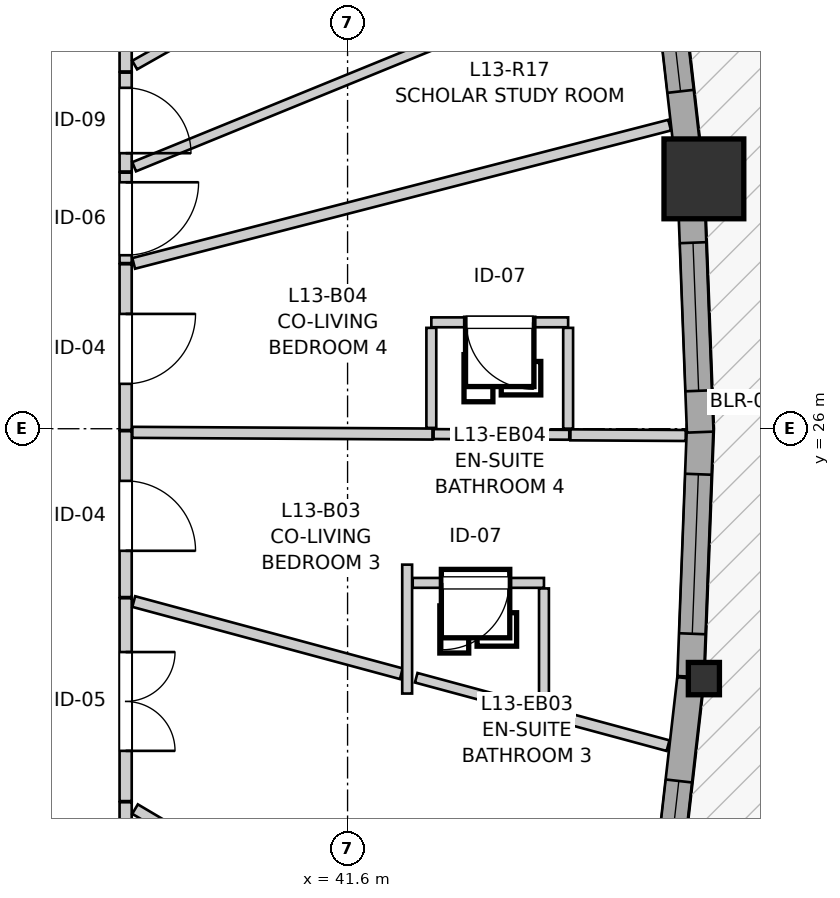
"""IFC4 building model, lengths in metres.
Left out: names, types, materials, properties, quantities, classifications, styles, units other than length and angle.
Written with IfcOpenShell. Run it as: python <this file> out.ifc"""

import sys

from ifc_helpers import new_model, si_unit, direction, frame, frame_2d, origin, origin_2d, place, context, subcontext, project, spatial, rectangle, i_section, extrude, source, transform, mapped, element, fill, save


model = new_model("IFC4")
c1 = context("Model", 3, precision=1e-05, world=origin(), true_north=direction((0.0, 1.0)))
c2 = subcontext(c1, "Body", "Model", "MODEL_VIEW")
j1 = project(units=[si_unit("LENGTHUNIT", "METRE"), si_unit("PLANEANGLEUNIT", "RADIAN")], contexts=[c1])
p1 = place(None, origin())
s1 = spatial("IfcSite", under=j1, at=p1, CompositionType="ELEMENT")
p2 = place(p1, origin())
s2 = spatial("IfcBuilding", under=s1, at=p2, CompositionType="ELEMENT")
p3 = place(p2, frame((0.0, 0.0, 46.2)))
s3 = spatial("IfcBuildingStorey", under=s2, at=p3, CompositionType="ELEMENT", Elevation=46.2)
m1 = source(origin(), c2, "Body", "SweptSolid", [
    extrude(i_section(OverallWidth=0.409, OverallDepth=0.425, WebThickness=0.03, FlangeThickness=0.048, FilletRadius=0.015, at=origin_2d()), origin(), (0.0, 0.0, 1.0), 2.94),
])
p4 = place(p3, frame((46.288, 22.713, 0.0), z_axis=(0.0, 0.0, 1.0), x_axis=(1.0, 0.0, 0.0)))
e1 = element("IfcColumn", 1, at=p4, inside=s3, PredefinedType="PILASTER", context=c2, shape_type="MappedRepresentation", body=[
    mapped(m1, transform((0.0, 0.0, 0.0), x_axis=(1.0, 0.0, 0.0), y_axis=(0.0, 1.0, 0.0), z_axis=(0.0, 0.0, 1.0), scale=1.0)),
])
m2 = source(origin(), c2, "Body", "SweptSolid", [
    extrude(rectangle(XDim=1.05, YDim=1.05, at=origin_2d()), origin(), (0.0, 0.0, 1.0), 2.94),
])
p5 = place(p3, frame((46.288, 29.287, 0.0), z_axis=(0.0, 0.0, 1.0), x_axis=(1.0, 0.0, 0.0)))
e2 = element("IfcColumn", 2, at=p5, inside=s3, PredefinedType="COLUMN", context=c2, shape_type="MappedRepresentation", body=[
    mapped(m2, transform((0.0, 0.0, 0.0), x_axis=(1.0, 0.0, 0.0), y_axis=(0.0, 1.0, 0.0), z_axis=(0.0, 0.0, 1.0), scale=1.0)),
])
p6 = place(p3, frame((45.735, 19.407, 0.0), z_axis=(0.0, 0.0, 1.0), x_axis=(0.113314766684, 0.993559139484, 0.0)))
e3 = element("IfcWall", 3, at=p6, inside=s3, PredefinedType="SOLIDWALL", context=c2, shape_type="SweptSolid", body=[
    extrude(rectangle(XDim=3.327, YDim=0.35, at=frame_2d((1.663, 0.0))), origin(), (0.0, 0.0, 1.0), 2.42),
])
p7 = place(p6, frame((0.521, 0.0, 0.82)))
e4 = element("IfcOpeningElement", 4, at=p7, cuts=e3, PredefinedType="OPENING", context=c2, shape_type="SweptSolid", body=[
    extrude(rectangle(XDim=1.45, YDim=1.25, at=frame_2d((0.725, 0.625))), frame((0.0, 0.185, 0.0), z_axis=(0.0, -1.0, 0.0), x_axis=(1.0, 0.0, 0.0)), (0.0, 0.0, 1.0), 0.37),
])
p8 = place(p3, frame((46.114, 22.739, 0.0), z_axis=(0.0, 0.0, 1.0), x_axis=(0.038010770715, 0.999277329529, 0.0)))
e5 = element("IfcWall", 5, at=p8, inside=s3, PredefinedType="SOLIDWALL", context=c2, shape_type="SweptSolid", body=[
    extrude(rectangle(XDim=3.308, YDim=0.35, at=frame_2d((1.654, 0.0))), origin(), (0.0, 0.0, 1.0), 2.42),
])
p9 = place(p8, frame((0.564, 0.0, 0.82)))
e6 = element("IfcOpeningElement", 6, at=p9, cuts=e5, PredefinedType="OPENING", context=c2, shape_type="SweptSolid", body=[
    extrude(rectangle(XDim=2.1, YDim=1.4, at=frame_2d((1.05, 0.7))), frame((0.0, 0.185, 0.0), z_axis=(0.0, -1.0, 0.0), x_axis=(1.0, 0.0, 0.0)), (0.0, 0.0, 1.0), 0.37),
])
p10 = place(p3, frame((46.24, 25.955, 0.0), z_axis=(0.0, 0.0, 1.0), x_axis=(-0.038058423581, 0.999275515759, 0.0)))
e7 = element("IfcWall", 7, at=p10, inside=s3, PredefinedType="SOLIDWALL", context=c2, shape_type="SweptSolid", body=[
    extrude(rectangle(XDim=3.028, YDim=0.35, at=frame_2d((1.514, 0.0))), origin(), (0.0, 0.0, 1.0), 2.42),
])
p11 = place(p10, frame((0.544, 0.0, 0.82)))
e8 = element("IfcOpeningElement", 8, at=p11, cuts=e7, PredefinedType="OPENING", context=c2, shape_type="SweptSolid", body=[
    extrude(rectangle(XDim=1.95, YDim=1.4, at=frame_2d((0.975, 0.7))), frame((0.0, 0.185, 0.0), z_axis=(0.0, -1.0, 0.0), x_axis=(1.0, 0.0, 0.0)), (0.0, 0.0, 1.0), 0.37),
])
p12 = place(p3, frame((46.08, 29.566, 0.0), z_axis=(0.0, 0.0, 1.0), x_axis=(-0.113307030468, 0.993560021763, 0.0)))
e9 = element("IfcWall", 9, at=p12, inside=s3, PredefinedType="SOLIDWALL", context=c2, shape_type="SweptSolid", body=[
    extrude(rectangle(XDim=3.047, YDim=0.35, at=frame_2d((1.523, 0.0))), origin(), (0.0, 0.0, 1.0), 2.42),
])
p13 = place(p12, frame((0.879, 0.0, 0.82)))
e10 = element("IfcOpeningElement", 10, at=p13, cuts=e9, PredefinedType="OPENING", context=c2, shape_type="SweptSolid", body=[
    extrude(rectangle(XDim=1.4, YDim=1.35, at=frame_2d((0.7, 0.675))), frame((0.0, 0.185, 0.0), z_axis=(0.0, -1.0, 0.0), x_axis=(1.0, 0.0, 0.0)), (0.0, 0.0, 1.0), 0.37),
])
p14 = place(p3, frame((38.68, 36.58, 0.0), z_axis=(0.0, 0.0, 1.0), x_axis=(0.0, -1.0, 0.0)))
e11 = element("IfcWall", 11, at=p14, inside=s3, PredefinedType="PARTITIONING", context=c2, shape_type="SweptSolid", body=[
    extrude(rectangle(XDim=5.88, YDim=0.16, at=frame_2d((2.94, 0.0))), origin(), (0.0, 0.0, 1.0), 2.94),
])
p15 = place(p14, frame((2.281, 0.0, 0.0)))
e12 = element("IfcOpeningElement", 12, at=p15, cuts=e11, PredefinedType="OPENING", context=c2, shape_type="SweptSolid", body=[
    extrude(rectangle(XDim=1.3, YDim=2.1, at=frame_2d((0.65, 1.05))), frame((0.0, 0.09, 0.0), z_axis=(0.0, -1.0, 0.0), x_axis=(1.0, 0.0, 0.0)), (0.0, 0.0, 1.0), 0.18),
])
p16 = place(p3, frame((38.68, 21.086, 0.0), z_axis=(0.0, 0.0, 1.0), x_axis=(0.0, -1.0, 0.0)))
e13 = element("IfcWall", 13, at=p16, inside=s3, PredefinedType="PARTITIONING", context=c2, shape_type="SweptSolid", body=[
    extrude(rectangle(XDim=5.666, YDim=0.16, at=frame_2d((2.833, 0.0))), origin(), (0.0, 0.0, 1.0), 2.94),
])
p17 = place(p16, frame((2.362, 0.0, 0.0)))
e14 = element("IfcOpeningElement", 14, at=p17, cuts=e13, PredefinedType="OPENING", context=c2, shape_type="SweptSolid", body=[
    extrude(rectangle(XDim=0.96, YDim=2.1, at=frame_2d((0.48, 1.05))), frame((0.0, 0.09, 0.0), z_axis=(0.0, -1.0, 0.0), x_axis=(1.0, 0.0, 0.0)), (0.0, 0.0, 1.0), 0.18),
])
p18 = place(p3, frame((38.68, 23.77, 0.0), z_axis=(0.0, 0.0, 1.0), x_axis=(0.0, -1.0, 0.0)))
e15 = element("IfcWall", 15, at=p18, inside=s3, PredefinedType="PARTITIONING", context=c2, shape_type="SweptSolid", body=[
    extrude(rectangle(XDim=2.669, YDim=0.16, at=frame_2d((1.334, 0.0))), origin(), (0.0, 0.0, 1.0), 2.94),
])
p19 = place(p18, frame((0.708, 0.0, 0.0)))
e16 = element("IfcOpeningElement", 16, at=p19, cuts=e15, PredefinedType="OPENING", context=c2, shape_type="SweptSolid", body=[
    extrude(rectangle(XDim=1.3, YDim=2.1, at=frame_2d((0.65, 1.05))), frame((0.0, 0.09, 0.0), z_axis=(0.0, -1.0, 0.0), x_axis=(1.0, 0.0, 0.0)), (0.0, 0.0, 1.0), 0.18),
])
p20 = place(p3, frame((38.68, 25.968, 0.0), z_axis=(0.0, 0.0, 1.0), x_axis=(0.0, -1.0, 0.0)))
e17 = element("IfcWall", 17, at=p20, inside=s3, PredefinedType="PARTITIONING", context=c2, shape_type="SweptSolid", body=[
    extrude(rectangle(XDim=2.183, YDim=0.16, at=frame_2d((1.092, 0.0))), origin(), (0.0, 0.0, 1.0), 2.94),
])
p21 = place(p20, frame((0.654, 0.0, 0.0)))
e18 = element("IfcOpeningElement", 18, at=p21, cuts=e17, PredefinedType="OPENING", context=c2, shape_type="SweptSolid", body=[
    extrude(rectangle(XDim=0.92, YDim=2.1, at=frame_2d((0.46, 1.05))), frame((0.0, 0.09, 0.0), z_axis=(0.0, -1.0, 0.0), x_axis=(1.0, 0.0, 0.0)), (0.0, 0.0, 1.0), 0.18),
])
p22 = place(p3, frame((38.68, 28.164, 0.0), z_axis=(0.0, 0.0, 1.0), x_axis=(0.0, -1.0, 0.0)))
e19 = element("IfcWall", 19, at=p22, inside=s3, PredefinedType="PARTITIONING", context=c2, shape_type="SweptSolid", body=[
    extrude(rectangle(XDim=2.181, YDim=0.16, at=frame_2d((1.091, 0.0))), origin(), (0.0, 0.0, 1.0), 2.94),
])
p23 = place(p22, frame((0.654, 0.0, 0.0)))
e20 = element("IfcOpeningElement", 20, at=p23, cuts=e19, PredefinedType="OPENING", context=c2, shape_type="SweptSolid", body=[
    extrude(rectangle(XDim=0.92, YDim=2.1, at=frame_2d((0.46, 1.05))), frame((0.0, 0.09, 0.0), z_axis=(0.0, -1.0, 0.0), x_axis=(1.0, 0.0, 0.0)), (0.0, 0.0, 1.0), 0.18),
])
p24 = place(p3, frame((44.502, 27.4, 0.0), z_axis=(0.0, 0.0, 1.0), x_axis=(-1.0, 0.0, 0.0)))
e21 = element("IfcWall", 21, at=p24, inside=s3, PredefinedType="PARTITIONING", context=c2, shape_type="SweptSolid", body=[
    extrude(rectangle(XDim=1.8, YDim=0.13, at=frame_2d((0.9, 0.0))), origin(), (0.0, 0.0, 1.0), 2.94),
])
p25 = place(p24, frame((0.46, 0.0, 0.0)))
e22 = element("IfcOpeningElement", 22, at=p25, cuts=e21, PredefinedType="OPENING", context=c2, shape_type="SweptSolid", body=[
    extrude(rectangle(XDim=0.88, YDim=2.05, at=frame_2d((0.44, 1.025))), frame((0.0, 0.075, 0.0), z_axis=(0.0, -1.0, 0.0), x_axis=(1.0, 0.0, 0.0)), (0.0, 0.0, 1.0), 0.15),
])
p26 = place(p3, frame((44.184, 23.972, 0.0), z_axis=(0.0, 0.0, 1.0), x_axis=(-1.0, 0.0, 0.0)))
e23 = element("IfcWall", 23, at=p26, inside=s3, PredefinedType="PARTITIONING", context=c2, shape_type="SweptSolid", body=[
    extrude(rectangle(XDim=1.727, YDim=0.13, at=frame_2d((0.864, 0.0))), origin(), (0.0, 0.0, 1.0), 2.94),
])
p27 = place(p26, frame((0.46, 0.0, 0.0)))
e24 = element("IfcOpeningElement", 24, at=p27, cuts=e23, PredefinedType="OPENING", context=c2, shape_type="SweptSolid", body=[
    extrude(rectangle(XDim=0.88, YDim=2.05, at=frame_2d((0.44, 1.025))), frame((0.0, 0.075, 0.0), z_axis=(0.0, -1.0, 0.0), x_axis=(1.0, 0.0, 0.0)), (0.0, 0.0, 1.0), 0.15),
])
p28 = place(p3, frame((38.68, 30.685, 0.0), z_axis=(0.0, 0.0, 1.0), x_axis=(0.0, -1.0, 0.0)))
e25 = element("IfcWall", 25, at=p28, inside=s3, PredefinedType="PARTITIONING", context=c2, shape_type="SweptSolid", body=[
    extrude(rectangle(XDim=1.301, YDim=0.16, at=frame_2d((0.65, 0.0))), origin(), (0.0, 0.0, 1.0), 2.94),
])
p29 = place(p28, frame((0.2, 0.0, 0.0)))
e26 = element("IfcOpeningElement", 26, at=p29, cuts=e25, PredefinedType="OPENING", context=c2, shape_type="SweptSolid", body=[
    extrude(rectangle(XDim=0.86, YDim=2.05, at=frame_2d((0.43, 1.025))), frame((0.0, 0.09, 0.0), z_axis=(0.0, -1.0, 0.0), x_axis=(1.0, 0.0, 0.0)), (0.0, 0.0, 1.0), 0.18),
])
p30 = place(p3, frame((38.68, 29.369, 0.0), z_axis=(0.0, 0.0, 1.0), x_axis=(0.0, -1.0, 0.0)))
e27 = element("IfcWall", 27, at=p30, inside=s3, PredefinedType="PARTITIONING", context=c2, shape_type="SweptSolid", body=[
    extrude(rectangle(XDim=1.19, YDim=0.16, at=frame_2d((0.595, 0.0))), origin(), (0.0, 0.0, 1.0), 2.94),
])
p31 = place(p30, frame((0.126, 0.0, 0.0)))
e28 = element("IfcOpeningElement", 28, at=p31, cuts=e27, PredefinedType="OPENING", context=c2, shape_type="SweptSolid", body=[
    extrude(rectangle(XDim=0.96, YDim=2.1, at=frame_2d((0.48, 1.05))), frame((0.0, 0.09, 0.0), z_axis=(0.0, -1.0, 0.0), x_axis=(1.0, 0.0, 0.0)), (0.0, 0.0, 1.0), 0.18),
])
p32 = place(p3, frame((38.804, 20.996, 0.0), z_axis=(0.0, 0.0, 1.0), x_axis=(0.860541640281, -0.509380099084, 0.0)))
e29 = element("IfcWall", 29, at=p32, inside=s3, PredefinedType="PARTITIONING", context=c2, shape_type="SweptSolid", body=[
    extrude(rectangle(XDim=7.354, YDim=0.145, at=frame_2d((3.677, 0.0))), origin(), (0.0, 0.0, 1.0), 2.94),
])
p33 = place(p3, frame((38.799, 30.784, 0.0), z_axis=(0.0, 0.0, 1.0), x_axis=(0.870159349722, 0.492770439547, 0.0)))
e30 = element("IfcWall", 30, at=p33, inside=s3, PredefinedType="PARTITIONING", context=c2, shape_type="SweptSolid", body=[
    extrude(rectangle(XDim=7.353, YDim=0.13, at=frame_2d((3.676, 0.0))), origin(), (0.0, 0.0, 1.0), 2.94),
])
p34 = place(p3, frame((38.792, 29.447, 0.0), z_axis=(0.0, 0.0, 1.0), x_axis=(0.925857634668, 0.377872518618, 0.0)))
e31 = element("IfcWall", 31, at=p34, inside=s3, PredefinedType="PARTITIONING", context=c2, shape_type="SweptSolid", body=[
    extrude(rectangle(XDim=7.328, YDim=0.13, at=frame_2d((3.664, 0.0))), origin(), (0.0, 0.0, 1.0), 2.94),
])
p35 = place(p3, frame((38.786, 28.175, 0.0), z_axis=(0.0, 0.0, 1.0), x_axis=(0.96830505458, 0.249770537242, 0.0)))
e32 = element("IfcWall", 32, at=p35, inside=s3, PredefinedType="PARTITIONING", context=c2, shape_type="SweptSolid", body=[
    extrude(rectangle(XDim=7.282, YDim=0.145, at=frame_2d((3.641, 0.0))), origin(), (0.0, 0.0, 1.0), 2.94),
])
p36 = place(p3, frame((38.768, 25.952, 0.0), z_axis=(0.0, 0.0, 1.0), x_axis=(0.999983822916, -0.005688049444, 0.0)))
e33 = element("IfcWall", 33, at=p36, inside=s3, PredefinedType="PARTITIONING", context=c2, shape_type="SweptSolid", body=[
    extrude(rectangle(XDim=3.949, YDim=0.145, at=frame_2d((1.974, 0.0))), origin(), (0.0, 0.0, 1.0), 2.94),
])
p37 = place(p3, frame((38.787, 23.726, 0.0), z_axis=(0.0, 0.0, 1.0), x_axis=(0.965490888833, -0.260436832228, 0.0)))
e34 = element("IfcWall", 34, at=p37, inside=s3, PredefinedType="PARTITIONING", context=c2, shape_type="SweptSolid", body=[
    extrude(rectangle(XDim=3.646, YDim=0.145, at=frame_2d((1.823, 0.0))), origin(), (0.0, 0.0, 1.0), 2.94),
])
p38 = place(p3, frame((42.503, 22.724, 0.0), z_axis=(0.0, 0.0, 1.0), x_axis=(0.965583538466, -0.260093118409, 0.0)))
e35 = element("IfcWall", 35, at=p38, inside=s3, PredefinedType="PARTITIONING", context=c2, shape_type="SweptSolid", body=[
    extrude(rectangle(XDim=1.756, YDim=0.13, at=frame_2d((0.878, 0.0))), origin(), (0.0, 0.0, 1.0), 2.94),
])
p39 = place(p3, frame((42.732, 25.93, 0.0), z_axis=(0.0, 0.0, 1.0), x_axis=(0.999985037372, -0.005470377666, 0.0)))
e36 = element("IfcWall", 36, at=p39, inside=s3, PredefinedType="PARTITIONING", context=c2, shape_type="SweptSolid", body=[
    extrude(rectangle(XDim=1.785, YDim=0.13, at=frame_2d((0.893, 0.0))), origin(), (0.0, 0.0, 1.0), 2.94),
])
p40 = place(p3, frame((44.184, 22.364, 0.0), z_axis=(0.0, 0.0, 1.0), x_axis=(0.0, 1.0, 0.0)))
e37 = element("IfcWall", 37, at=p40, inside=s3, PredefinedType="PARTITIONING", context=c2, shape_type="SweptSolid", body=[
    extrude(rectangle(XDim=1.535, YDim=0.13, at=frame_2d((0.768, 0.0))), origin(), (0.0, 0.0, 1.0), 2.94),
])
p41 = place(p3, frame((44.305, 22.238, 0.0), z_axis=(0.0, 0.0, 1.0), x_axis=(0.96544085657, -0.260622240925, 0.0)))
e38 = element("IfcWall", 38, at=p41, inside=s3, PredefinedType="PARTITIONING", context=c2, shape_type="SweptSolid", body=[
    extrude(rectangle(XDim=1.565, YDim=0.145, at=frame_2d((0.783, 0.0))), origin(), (0.0, 0.0, 1.0), 2.94),
])
p42 = place(p3, frame((44.532, 25.92, 0.0), z_axis=(0.0, 0.0, 1.0), x_axis=(0.999984138171, -0.00563235353, 0.0)))
e39 = element("IfcWall", 39, at=p42, inside=s3, PredefinedType="PARTITIONING", context=c2, shape_type="SweptSolid", body=[
    extrude(rectangle(XDim=1.517, YDim=0.145, at=frame_2d((0.759, 0.0))), origin(), (0.0, 0.0, 1.0), 2.94),
])
p43 = place(p3, frame((44.502, 26.001, 0.0), z_axis=(0.0, 0.0, 1.0), x_axis=(0.0, 1.0, 0.0)))
e40 = element("IfcWall", 40, at=p43, inside=s3, PredefinedType="PARTITIONING", context=c2, shape_type="SweptSolid", body=[
    extrude(rectangle(XDim=1.326, YDim=0.13, at=frame_2d((0.663, 0.0))), origin(), (0.0, 0.0, 1.0), 2.94),
])
p44 = place(p3, frame((42.702, 26.011, 0.0), z_axis=(0.0, 0.0, 1.0), x_axis=(0.0, 1.0, 0.0)))
e41 = element("IfcWall", 41, at=p44, inside=s3, PredefinedType="PARTITIONING", context=c2, shape_type="SweptSolid", body=[
    extrude(rectangle(XDim=1.316, YDim=0.13, at=frame_2d((0.658, 0.0))), origin(), (0.0, 0.0, 1.0), 2.94),
])
p45 = place(p3, frame((42.384, 22.516, 0.0), z_axis=(0.0, 0.0, 1.0), x_axis=(0.0, 1.0, 0.0)))
e42 = element("IfcWall", 42, at=p45, inside=s3, PredefinedType="PARTITIONING", context=c2, shape_type="SweptSolid", body=[
    extrude(rectangle(XDim=1.696, YDim=0.13, at=frame_2d((0.848, 0.0))), origin(), (0.0, 0.0, 1.0), 2.94),
])
m3 = source(origin(), c2, "Body", "SweptSolid", [
    extrude(rectangle(XDim=1.45, YDim=1.25, at=frame_2d((0.725, 0.625))), frame((0.0, 0.03, 0.0), z_axis=(0.0, -1.0, 0.0), x_axis=(1.0, 0.0, 0.0)), (0.0, 0.0, 1.0), 0.06),
])
p46 = place(p7, origin())
e43 = element("IfcWindow", 43, at=p46, inside=s3, PartitioningType="SINGLE_PANEL", PredefinedType="WINDOW", context=c2, shape_type="MappedRepresentation", body=[
    mapped(m3, transform((0.0, 0.0, 0.0), x_axis=(1.0, 0.0, 0.0), y_axis=(0.0, 1.0, 0.0), z_axis=(0.0, 0.0, 1.0), scale=1.0)),
])
fill(e4, e43)
m4 = source(origin(), c2, "Body", "SweptSolid", [
    extrude(rectangle(XDim=2.1, YDim=1.4, at=frame_2d((1.05, 0.7))), frame((0.0, 0.03, 0.0), z_axis=(0.0, -1.0, 0.0), x_axis=(1.0, 0.0, 0.0)), (0.0, 0.0, 1.0), 0.06),
])
p47 = place(p9, origin())
e44 = element("IfcWindow", 44, at=p47, inside=s3, PartitioningType="SINGLE_PANEL", PredefinedType="WINDOW", context=c2, shape_type="MappedRepresentation", body=[
    mapped(m4, transform((0.0, 0.0, 0.0), x_axis=(1.0, 0.0, 0.0), y_axis=(0.0, 1.0, 0.0), z_axis=(0.0, 0.0, 1.0), scale=1.0)),
])
fill(e6, e44)
m5 = source(origin(), c2, "Body", "SweptSolid", [
    extrude(rectangle(XDim=1.95, YDim=1.4, at=frame_2d((0.975, 0.7))), frame((0.0, 0.03, 0.0), z_axis=(0.0, -1.0, 0.0), x_axis=(1.0, 0.0, 0.0)), (0.0, 0.0, 1.0), 0.06),
])
p48 = place(p11, origin())
e45 = element("IfcWindow", 45, at=p48, inside=s3, PartitioningType="SINGLE_PANEL", PredefinedType="WINDOW", context=c2, shape_type="MappedRepresentation", body=[
    mapped(m5, transform((0.0, 0.0, 0.0), x_axis=(1.0, 0.0, 0.0), y_axis=(0.0, 1.0, 0.0), z_axis=(0.0, 0.0, 1.0), scale=1.0)),
])
fill(e8, e45)
m6 = source(origin(), c2, "Body", "SweptSolid", [
    extrude(rectangle(XDim=1.4, YDim=1.35, at=frame_2d((0.7, 0.675))), frame((0.0, 0.03, 0.0), z_axis=(0.0, -1.0, 0.0), x_axis=(1.0, 0.0, 0.0)), (0.0, 0.0, 1.0), 0.06),
])
p49 = place(p13, origin())
e46 = element("IfcWindow", 46, at=p49, inside=s3, PartitioningType="SINGLE_PANEL", PredefinedType="WINDOW", context=c2, shape_type="MappedRepresentation", body=[
    mapped(m6, transform((0.0, 0.0, 0.0), x_axis=(1.0, 0.0, 0.0), y_axis=(0.0, 1.0, 0.0), z_axis=(0.0, 0.0, 1.0), scale=1.0)),
])
fill(e10, e46)
m7 = source(origin(), c2, "Body", "SweptSolid", [
    extrude(rectangle(XDim=1.3, YDim=2.1, at=frame_2d((0.65, 1.05))), frame((0.0, 0.025, 0.0), z_axis=(0.0, -1.0, 0.0), x_axis=(1.0, 0.0, 0.0)), (0.0, 0.0, 1.0), 0.05),
])
p50 = place(p19, origin())
e47 = element("IfcDoor", 47, at=p50, inside=s3, OperationType="DOUBLE_DOOR_SINGLE_SWING", PredefinedType="DOOR", context=c2, shape_type="MappedRepresentation", body=[
    mapped(m7, transform((0.0, 0.0, 0.0), x_axis=(1.0, 0.0, 0.0), y_axis=(0.0, 1.0, 0.0), z_axis=(0.0, 0.0, 1.0), scale=1.0)),
])
fill(e16, e47)
m8 = source(origin(), c2, "Body", "SweptSolid", [
    extrude(rectangle(XDim=0.92, YDim=2.1, at=frame_2d((0.46, 1.05))), frame((0.0, 0.025, 0.0), z_axis=(0.0, -1.0, 0.0), x_axis=(1.0, 0.0, 0.0)), (0.0, 0.0, 1.0), 0.05),
])
p51 = place(p21, origin())
e48 = element("IfcDoor", 48, at=p51, inside=s3, OperationType="SINGLE_SWING_RIGHT", PredefinedType="DOOR", context=c2, shape_type="MappedRepresentation", body=[
    mapped(m8, transform((0.0, 0.0, 0.0), x_axis=(1.0, 0.0, 0.0), y_axis=(0.0, 1.0, 0.0), z_axis=(0.0, 0.0, 1.0), scale=1.0)),
])
fill(e18, e48)
p52 = place(p23, origin())
e49 = element("IfcDoor", 49, at=p52, inside=s3, OperationType="SINGLE_SWING_LEFT", PredefinedType="DOOR", context=c2, shape_type="MappedRepresentation", body=[
    mapped(m8, transform((0.0, 0.0, 0.0), x_axis=(1.0, 0.0, 0.0), y_axis=(0.0, 1.0, 0.0), z_axis=(0.0, 0.0, 1.0), scale=1.0)),
])
fill(e20, e49)
m9 = source(origin(), c2, "Body", "SweptSolid", [
    extrude(rectangle(XDim=0.88, YDim=2.05, at=frame_2d((0.44, 1.025))), frame((0.0, 0.025, 0.0), z_axis=(0.0, -1.0, 0.0), x_axis=(1.0, 0.0, 0.0)), (0.0, 0.0, 1.0), 0.05),
])
p53 = place(p25, origin())
e50 = element("IfcDoor", 50, at=p53, inside=s3, OperationType="SINGLE_SWING_LEFT", PredefinedType="DOOR", context=c2, shape_type="MappedRepresentation", body=[
    mapped(m9, transform((0.0, 0.0, 0.0), x_axis=(1.0, 0.0, 0.0), y_axis=(0.0, 1.0, 0.0), z_axis=(0.0, 0.0, 1.0), scale=1.0)),
])
fill(e22, e50)
p54 = place(p27, origin())
e51 = element("IfcDoor", 51, at=p54, inside=s3, OperationType="SINGLE_SWING_RIGHT", PredefinedType="DOOR", context=c2, shape_type="MappedRepresentation", body=[
    mapped(m9, transform((0.0, 0.0, 0.0), x_axis=(1.0, 0.0, 0.0), y_axis=(0.0, 1.0, 0.0), z_axis=(0.0, 0.0, 1.0), scale=1.0)),
])
fill(e24, e51)
m10 = source(origin(), c2, "Body", "SweptSolid", [
    extrude(rectangle(XDim=0.86, YDim=2.05, at=frame_2d((0.43, 1.025))), frame((0.0, 0.025, 0.0), z_axis=(0.0, -1.0, 0.0), x_axis=(1.0, 0.0, 0.0)), (0.0, 0.0, 1.0), 0.05),
])
p55 = place(p29, origin())
e52 = element("IfcDoor", 52, at=p55, inside=s3, OperationType="SINGLE_SWING_RIGHT", PredefinedType="DOOR", context=c2, shape_type="MappedRepresentation", body=[
    mapped(m10, transform((0.0, 0.0, 0.0), x_axis=(1.0, 0.0, 0.0), y_axis=(0.0, 1.0, 0.0), z_axis=(0.0, 0.0, 1.0), scale=1.0)),
])
fill(e26, e52)
m11 = source(origin(), c2, "Body", "SweptSolid", [
    extrude(rectangle(XDim=0.96, YDim=2.1, at=frame_2d((0.48, 1.05))), frame((0.0, 0.025, 0.0), z_axis=(0.0, -1.0, 0.0), x_axis=(1.0, 0.0, 0.0)), (0.0, 0.0, 1.0), 0.05),
])
p56 = place(p31, origin())
e53 = element("IfcDoor", 53, at=p56, inside=s3, OperationType="SINGLE_SWING_LEFT", PredefinedType="DOOR", context=c2, shape_type="MappedRepresentation", body=[
    mapped(m11, transform((0.0, 0.0, 0.0), x_axis=(1.0, 0.0, 0.0), y_axis=(0.0, 1.0, 0.0), z_axis=(0.0, 0.0, 1.0), scale=1.0)),
])
fill(e28, e53)
save(model, sys.argv[1])
